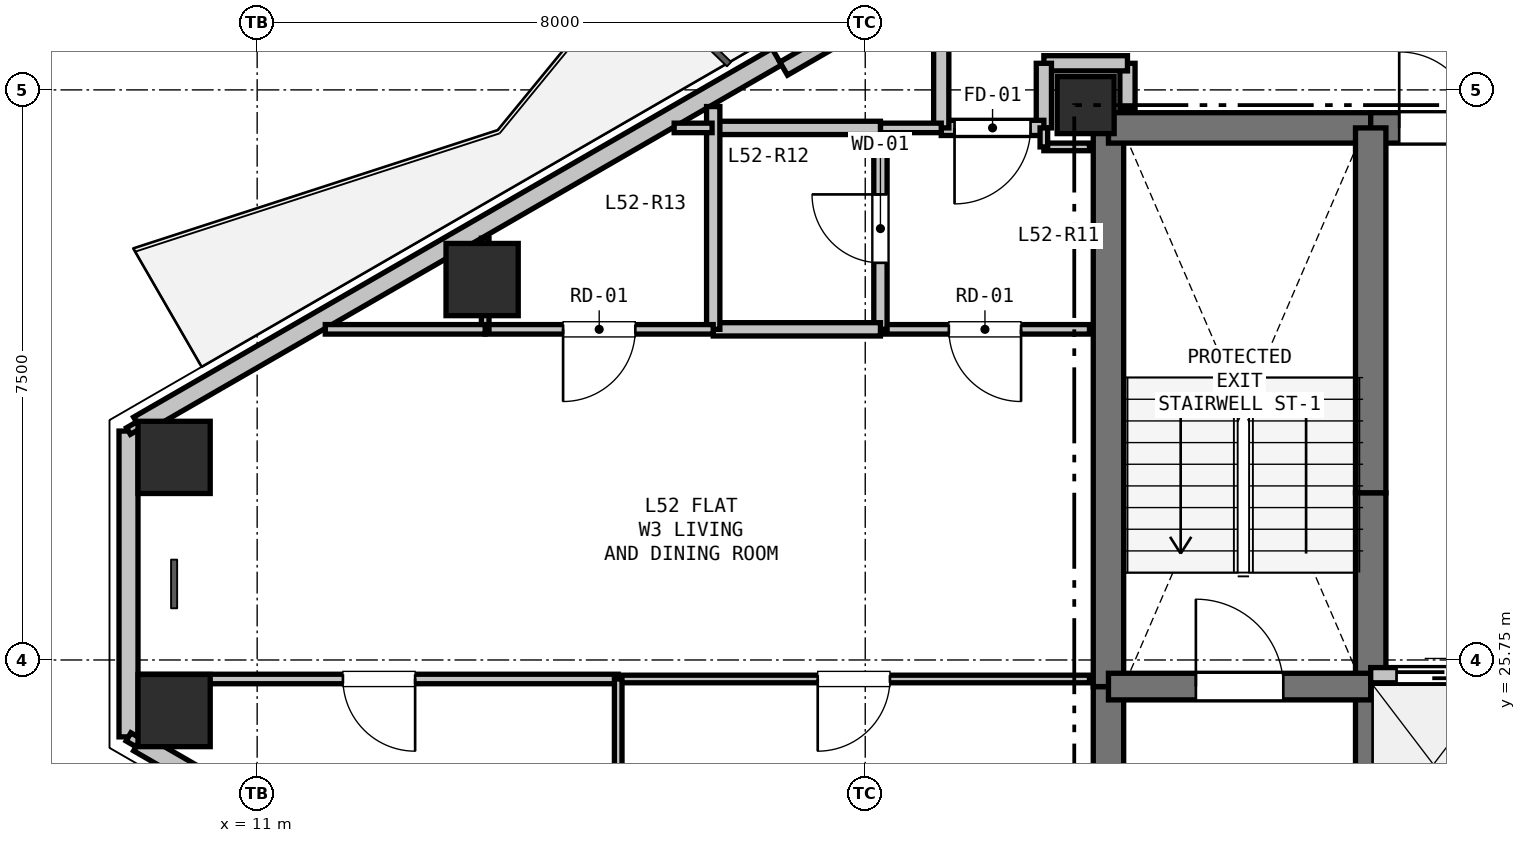
"""IFC4 building model, lengths in metres.
Left out: names, types, materials, properties, quantities, classifications, styles, units other than length and angle.
Written with IfcOpenShell. Run it as: python <this file> out.ifc"""

import sys

from ifc_helpers import new_model, si_unit, direction, frame, frame_2d, origin, origin_2d, place, context, subcontext, project, spatial, rectangle, hollow_rectangle, extrude, element, fill, save


model = new_model("IFC4")
c1 = context("Model", 3, precision=1e-05, world=origin(), true_north=direction((0.0, 1.0)))
c2 = subcontext(c1, "Body", "Model", "MODEL_VIEW")
j1 = project(units=[si_unit("LENGTHUNIT", "METRE"), si_unit("PLANEANGLEUNIT", "RADIAN")], contexts=[c1])
p1 = place(None, origin())
s1 = spatial("IfcSite", under=j1, at=p1, CompositionType="ELEMENT")
p2 = place(p1, origin())
s2 = spatial("IfcBuilding", under=s1, at=p2, CompositionType="ELEMENT")
p3 = place(p2, frame((0.0, 0.0, 188.7)))
s3 = spatial("IfcBuildingStorey", under=s2, at=p3, CompositionType="ELEMENT", Elevation=188.7)
p4 = place(p3, frame((21.9, 33.05, 0.0), z_axis=(0.0, 0.0, 1.0), x_axis=(1.0, 0.0, 0.0)))
e1 = element("IfcColumn", 1, at=p4, inside=s3, PredefinedType="COLUMN", context=c2, shape_type="SweptSolid", body=[
    extrude(rectangle(XDim=0.75, YDim=0.75, at=origin_2d()), origin(), (0.0, 0.0, 1.0), 3.3),
])
for number, where, z_axis, x_axis in (
    (2, (9.907, 28.415, 0.0), (0.0, 0.0, 1.0), (1.0, 0.0, 0.0)),
    (3, (13.96, 30.755, 0.0), (0.0, 0.0, 1.0), (1.0, 0.0, 0.0)),
    (4, (9.907, 25.085, 0.0), (0.0, 0.0, 1.0), (1.0, 0.0, 0.0)),
):
    element("IfcColumn", number, at=place(p3, frame(where, z_axis=z_axis, x_axis=x_axis)), inside=s3, PredefinedType="COLUMN", context=c2, shape_type="SweptSolid", body=[
        extrude(hollow_rectangle(XDim=0.95, YDim=0.95, WallThickness=0.028, at=origin_2d()), origin(), (0.0, 0.0, 1.0), 3.3),
    ])
p5 = place(p3, frame((9.308, 24.738, 0.0), z_axis=(0.0, 0.0, 1.0), x_axis=(0.0, 1.0, 0.0)))
e5 = element("IfcWall", 5, at=p5, inside=s3, PredefinedType="SOLIDWALL", context=c2, shape_type="SweptSolid", body=[
    extrude(rectangle(XDim=4.023, YDim=0.25, at=frame_2d((2.012, 0.0))), origin(), (0.0, 0.0, 1.0), 2.69),
])
p6 = place(p3, frame((9.438, 28.837, 0.0), z_axis=(0.0, 0.0, 1.0), x_axis=(0.866027133173, 0.499997004599, 0.0)))
e6 = element("IfcWall", 6, at=p6, inside=s3, PredefinedType="SOLIDWALL", context=c2, shape_type="SweptSolid", body=[
    extrude(rectangle(XDim=9.699, YDim=0.25, at=frame_2d((4.849, 0.0))), origin(), (0.0, 0.0, 1.0), 2.69),
])
p7 = place(p3, frame((17.927, 33.53, 0.0), z_axis=(0.0, 0.0, 1.0), x_axis=(0.86605165483, 0.499954529098, 0.0)))
e7 = element("IfcWall", 7, at=p7, inside=s3, PredefinedType="PARAPET", context=c2, shape_type="SweptSolid", body=[
    extrude(rectangle(XDim=1.7, YDim=0.2, at=frame_2d((0.85, 0.0))), origin(), (0.0, 0.0, 1.0), 2.69),
])
p8 = place(p3, frame((17.837, 19.814, 0.0), z_axis=(0.0, 0.0, 1.0), x_axis=(-0.866027133173, 0.499997004599, 0.0)))
e8 = element("IfcWall", 8, at=p8, inside=s3, PredefinedType="SOLIDWALL", context=c2, shape_type="SweptSolid", body=[
    extrude(rectangle(XDim=9.699, YDim=0.25, at=frame_2d((4.849, 0.0))), origin(), (0.0, 0.0, 1.0), 2.69),
])
p9 = place(p8, frame((5.512, 0.0, 0.9)))
e9 = element("IfcOpeningElement", 9, at=p9, cuts=e8, PredefinedType="OPENING", context=c2, shape_type="SweptSolid", body=[
    extrude(rectangle(XDim=1.2, YDim=1.4, at=frame_2d((0.6, 0.7))), frame((0.0, 0.135, 0.0), z_axis=(0.0, -1.0, 0.0), x_axis=(1.0, 0.0, 0.0)), (0.0, 0.0, 1.0), 0.27),
])
p10 = place(p3, frame((22.2, 20.75, 0.0), z_axis=(0.0, 0.0, 1.0), x_axis=(0.0, 1.0, 0.0)))
e10 = element("IfcWall", 10, at=p10, inside=s3, PredefinedType="SHEAR", context=c2, shape_type="SweptSolid", body=[
    extrude(rectangle(XDim=4.65, YDim=0.4, at=frame_2d((2.325, 0.0))), origin(), (0.0, 0.0, 1.0), 3.07),
])
p11 = place(p3, frame((22.2, 25.4, 0.0), z_axis=(0.0, 0.0, 1.0), x_axis=(0.0, 1.0, 0.0)))
e11 = element("IfcWall", 11, at=p11, inside=s3, PredefinedType="SHEAR", context=c2, shape_type="SweptSolid", body=[
    extrude(rectangle(XDim=7.35, YDim=0.4, at=frame_2d((3.675, 0.0))), origin(), (0.0, 0.0, 1.0), 3.07),
])
p12 = place(p3, frame((22.2, 32.75, 0.0), z_axis=(0.0, 0.0, 1.0), x_axis=(1.0, 0.0, 0.0)))
e12 = element("IfcWall", 12, at=p12, inside=s3, PredefinedType="SHEAR", context=c2, shape_type="SweptSolid", body=[
    extrude(rectangle(XDim=3.45, YDim=0.4, at=frame_2d((1.725, 0.0))), origin(), (0.0, 0.0, 1.0), 3.07),
])
p13 = place(p3, frame((25.65, 32.75, 0.0), z_axis=(0.0, 0.0, 1.0), x_axis=(1.0, 0.0, 0.0)))
e13 = element("IfcWall", 13, at=p13, inside=s3, PredefinedType="SHEAR", context=c2, shape_type="SweptSolid", body=[
    extrude(rectangle(XDim=1.75, YDim=0.4, at=frame_2d((0.875, 0.0))), origin(), (0.0, 0.0, 1.0), 3.07),
])
p14 = place(p13, frame((0.375, 0.0, 0.0)))
e14 = element("IfcOpeningElement", 14, at=p14, cuts=e13, PredefinedType="OPENING", context=c2, shape_type="SweptSolid", body=[
    extrude(rectangle(XDim=1.0, YDim=2.15, at=frame_2d((0.5, 1.075))), frame((0.0, 0.21, 0.0), z_axis=(0.0, -1.0, 0.0), x_axis=(1.0, 0.0, 0.0)), (0.0, 0.0, 1.0), 0.42),
])
p15 = place(p3, frame((25.65, 22.75, 0.0), z_axis=(0.0, 0.0, 1.0), x_axis=(0.0, 1.0, 0.0)))
e15 = element("IfcWall", 15, at=p15, inside=s3, PredefinedType="SHEAR", context=c2, shape_type="SweptSolid", body=[
    extrude(rectangle(XDim=2.8, YDim=0.4, at=frame_2d((1.4, 0.0))), origin(), (0.0, 0.0, 1.0), 3.07),
])
p16 = place(p3, frame((25.65, 25.55, 0.0), z_axis=(0.0, 0.0, 1.0), x_axis=(0.0, 1.0, 0.0)))
e16 = element("IfcWall", 16, at=p16, inside=s3, PredefinedType="SHEAR", context=c2, shape_type="SweptSolid", body=[
    extrude(rectangle(XDim=2.4, YDim=0.4, at=frame_2d((1.2, 0.0))), origin(), (0.0, 0.0, 1.0), 3.07),
])
p17 = place(p3, frame((25.65, 27.95, 0.0), z_axis=(0.0, 0.0, 1.0), x_axis=(0.0, 1.0, 0.0)))
e17 = element("IfcWall", 17, at=p17, inside=s3, PredefinedType="SHEAR", context=c2, shape_type="SweptSolid", body=[
    extrude(rectangle(XDim=4.8, YDim=0.4, at=frame_2d((2.4, 0.0))), origin(), (0.0, 0.0, 1.0), 3.07),
])
p18 = place(p3, frame((22.2, 25.4, 0.0), z_axis=(0.0, 0.0, 1.0), x_axis=(1.0, 0.0, 0.0)))
e18 = element("IfcWall", 18, at=p18, inside=s3, PredefinedType="SHEAR", context=c2, shape_type="SweptSolid", body=[
    extrude(rectangle(XDim=3.45, YDim=0.35, at=frame_2d((1.725, 0.0))), origin(), (0.0, 0.0, 1.0), 3.07),
])
p19 = place(p18, frame((1.15, 0.0, 0.0)))
e19 = element("IfcOpeningElement", 19, at=p19, cuts=e18, PredefinedType="OPENING", context=c2, shape_type="SweptSolid", body=[
    extrude(rectangle(XDim=1.15, YDim=2.15, at=frame_2d((0.575, 1.075))), frame((0.0, 0.185, 0.0), z_axis=(0.0, -1.0, 0.0), x_axis=(1.0, 0.0, 0.0)), (0.0, 0.0, 1.0), 0.37),
])
p20 = place(p3, frame((25.65, 25.55, 0.0), z_axis=(0.0, 0.0, 1.0), x_axis=(1.0, 0.0, 0.0)))
e20 = element("IfcWall", 20, at=p20, inside=s3, PredefinedType="PARTITIONING", context=c2, shape_type="SweptSolid", body=[
    extrude(rectangle(XDim=4.95, YDim=0.2, at=frame_2d((2.475, 0.0))), origin(), (0.0, 0.0, 1.0), 3.07),
])
p21 = place(p20, frame((0.34, 0.0, 0.0)))
e21 = element("IfcOpeningElement", 21, at=p21, cuts=e20, PredefinedType="OPENING", context=c2, shape_type="SweptSolid", body=[
    extrude(rectangle(XDim=1.1, YDim=2.15, at=frame_2d((0.55, 1.075))), frame((0.0, 0.11, 0.0), z_axis=(0.0, -1.0, 0.0), x_axis=(1.0, 0.0, 0.0)), (0.0, 0.0, 1.0), 0.22),
])
p22 = place(p20, frame((1.99, 0.0, 0.0)))
e22 = element("IfcOpeningElement", 22, at=p22, cuts=e20, PredefinedType="OPENING", context=c2, shape_type="SweptSolid", body=[
    extrude(rectangle(XDim=1.1, YDim=2.15, at=frame_2d((0.55, 1.075))), frame((0.0, 0.11, 0.0), z_axis=(0.0, -1.0, 0.0), x_axis=(1.0, 0.0, 0.0)), (0.0, 0.0, 1.0), 0.22),
])
p23 = place(p20, frame((3.64, 0.0, 0.0)))
e23 = element("IfcOpeningElement", 23, at=p23, cuts=e20, PredefinedType="OPENING", context=c2, shape_type="SweptSolid", body=[
    extrude(rectangle(XDim=1.1, YDim=2.15, at=frame_2d((0.55, 1.075))), frame((0.0, 0.11, 0.0), z_axis=(0.0, -1.0, 0.0), x_axis=(1.0, 0.0, 0.0)), (0.0, 0.0, 1.0), 0.22),
])
p24 = place(p3, frame((22.45, 33.0, 0.0), z_axis=(0.0, 0.0, 1.0), x_axis=(0.0, 1.0, 0.0)))
e24 = element("IfcWall", 24, at=p24, inside=s3, PredefinedType="PARTITIONING", context=c2, shape_type="SweptSolid", body=[
    extrude(rectangle(XDim=0.6, YDim=0.2, at=frame_2d((0.3, 0.0))), origin(), (0.0, 0.0, 1.0), 2.595),
])
p25 = place(p3, frame((22.45, 33.6, 0.0), z_axis=(0.0, 0.0, 1.0), x_axis=(-1.0, 0.0, 0.0)))
e25 = element("IfcWall", 25, at=p25, inside=s3, PredefinedType="PARTITIONING", context=c2, shape_type="SweptSolid", body=[
    extrude(rectangle(XDim=1.1, YDim=0.2, at=frame_2d((0.55, 0.0))), origin(), (0.0, 0.0, 1.0), 3.07),
])
p26 = place(p3, frame((21.35, 33.6, 0.0), z_axis=(0.0, 0.0, 1.0), x_axis=(0.0, -1.0, 0.0)))
e26 = element("IfcWall", 26, at=p26, inside=s3, PredefinedType="PARTITIONING", context=c2, shape_type="SweptSolid", body=[
    extrude(rectangle(XDim=0.85, YDim=0.2, at=frame_2d((0.425, 0.0))), origin(), (0.0, 0.0, 1.0), 2.518),
])
p27 = place(p3, frame((21.35, 32.75, 0.0), z_axis=(0.0, 0.0, 1.0), x_axis=(-1.0, 0.0, 0.0)))
e27 = element("IfcWall", 27, at=p27, inside=s3, PredefinedType="PARTITIONING", context=c2, shape_type="SweptSolid", body=[
    extrude(rectangle(XDim=1.35, YDim=0.2, at=frame_2d((0.675, 0.0))), origin(), (0.0, 0.0, 1.0), 2.518),
])
p28 = place(p27, frame((0.175, 0.0, 0.0)))
e28 = element("IfcOpeningElement", 28, at=p28, cuts=e27, PredefinedType="OPENING", context=c2, shape_type="SweptSolid", body=[
    extrude(rectangle(XDim=1.0, YDim=2.15, at=frame_2d((0.5, 1.075))), frame((0.0, 0.11, 0.0), z_axis=(0.0, -1.0, 0.0), x_axis=(1.0, 0.0, 0.0)), (0.0, 0.0, 1.0), 0.22),
])
p29 = place(p3, frame((20.0, 32.75, 0.0), z_axis=(0.0, 0.0, 1.0), x_axis=(0.0, 1.0, 0.0)))
e29 = element("IfcWall", 29, at=p29, inside=s3, PredefinedType="PARTITIONING", context=c2, shape_type="SweptSolid", body=[
    extrude(rectangle(XDim=2.141, YDim=0.2, at=frame_2d((1.071, 0.0))), origin(), (0.0, 0.0, 1.0), 2.365),
])
p30 = place(p3, frame((21.35, 32.5, 0.0), z_axis=(0.0, 0.0, 1.0), x_axis=(1.0, 0.0, 0.0)))
e30 = element("IfcWall", 30, at=p30, inside=s3, PredefinedType="PARTITIONING", context=c2, shape_type="SweptSolid", body=[
    extrude(rectangle(XDim=0.6, YDim=0.1, at=frame_2d((0.3, 0.0))), origin(), (0.0, 0.0, 1.0), 2.595),
])
p31 = place(p3, frame((21.95, 30.1, 0.0), z_axis=(0.0, 0.0, 1.0), x_axis=(-1.0, 0.0, 0.0)))
e31 = element("IfcWall", 31, at=p31, inside=s3, PredefinedType="PARTITIONING", context=c2, shape_type="SweptSolid", body=[
    extrude(rectangle(XDim=2.75, YDim=0.125, at=frame_2d((1.375, 0.0))), origin(), (0.0, 0.0, 1.0), 2.595),
])
p32 = place(p31, frame((0.9, 0.0, 0.0)))
e32 = element("IfcOpeningElement", 32, at=p32, cuts=e31, PredefinedType="OPENING", context=c2, shape_type="SweptSolid", body=[
    extrude(rectangle(XDim=0.95, YDim=2.1, at=frame_2d((0.475, 1.05))), frame((0.0, 0.073, 0.0), z_axis=(0.0, -1.0, 0.0), x_axis=(1.0, 0.0, 0.0)), (0.0, 0.0, 1.0), 0.145),
])
p33 = place(p3, frame((19.2, 30.1, 0.0), z_axis=(0.0, 0.0, 1.0), x_axis=(0.0, 1.0, 0.0)))
e33 = element("IfcWall", 33, at=p33, inside=s3, PredefinedType="PLUMBINGWALL", context=c2, shape_type="SweptSolid", body=[
    extrude(rectangle(XDim=2.65, YDim=0.175, at=frame_2d((1.325, 0.0))), origin(), (0.0, 0.0, 1.0), 2.518),
])
p34 = place(p33, frame((0.875, 0.0, 0.0)))
e34 = element("IfcOpeningElement", 34, at=p34, cuts=e33, PredefinedType="OPENING", context=c2, shape_type="SweptSolid", body=[
    extrude(rectangle(XDim=0.9, YDim=2.1, at=frame_2d((0.45, 1.05))), frame((0.0, 0.097, 0.0), z_axis=(0.0, -1.0, 0.0), x_axis=(1.0, 0.0, 0.0)), (0.0, 0.0, 1.0), 0.195),
])
p35 = place(p3, frame((19.2, 32.75, 0.0), z_axis=(0.0, 0.0, 1.0), x_axis=(1.0, 0.0, 0.0)))
e35 = element("IfcWall", 35, at=p35, inside=s3, PredefinedType="PARTITIONING", context=c2, shape_type="SweptSolid", body=[
    extrude(rectangle(XDim=0.8, YDim=0.125, at=frame_2d((0.4, 0.0))), origin(), (0.0, 0.0, 1.0), 3.07),
])
p36 = place(p3, frame((21.35, 32.75, 0.0), z_axis=(0.0, 0.0, 1.0), x_axis=(0.0, -1.0, 0.0)))
e36 = element("IfcWall", 36, at=p36, inside=s3, PredefinedType="PARTITIONING", context=c2, shape_type="SweptSolid", body=[
    extrude(rectangle(XDim=0.25, YDim=0.1, at=frame_2d((0.125, 0.0))), origin(), (0.0, 0.0, 1.0), 3.07),
])
p37 = place(p3, frame((17.0, 32.75, 0.0), z_axis=(0.0, 0.0, 1.0), x_axis=(1.0, 0.0, 0.0)))
e37 = element("IfcWall", 37, at=p37, inside=s3, PredefinedType="PLUMBINGWALL", context=c2, shape_type="SweptSolid", body=[
    extrude(rectangle(XDim=2.2, YDim=0.175, at=frame_2d((1.1, 0.0))), origin(), (0.0, 0.0, 1.0), 2.365),
])
p38 = place(p3, frame((19.2, 30.1, 0.0), z_axis=(0.0, 0.0, 1.0), x_axis=(-1.0, 0.0, 0.0)))
e38 = element("IfcWall", 38, at=p38, inside=s3, PredefinedType="PLUMBINGWALL", context=c2, shape_type="SweptSolid", body=[
    extrude(rectangle(XDim=2.2, YDim=0.175, at=frame_2d((1.1, 0.0))), origin(), (0.0, 0.0, 1.0), 3.07),
])
p39 = place(p3, frame((17.0, 30.1, 0.0), z_axis=(0.0, 0.0, 1.0), x_axis=(0.0, 1.0, 0.0)))
e39 = element("IfcWall", 39, at=p39, inside=s3, PredefinedType="PLUMBINGWALL", context=c2, shape_type="SweptSolid", body=[
    extrude(rectangle(XDim=2.931, YDim=0.175, at=frame_2d((1.465, 0.0))), origin(), (0.0, 0.0, 1.0), 2.365),
])
p40 = place(p3, frame((17.0, 30.1, 0.0), z_axis=(0.0, 0.0, 1.0), x_axis=(-1.0, 0.0, 0.0)))
e40 = element("IfcWall", 40, at=p40, inside=s3, PredefinedType="PARTITIONING", context=c2, shape_type="SweptSolid", body=[
    extrude(rectangle(XDim=3.0, YDim=0.125, at=frame_2d((1.5, 0.0))), origin(), (0.0, 0.0, 1.0), 3.07),
])
p41 = place(p40, frame((1.025, 0.0, 0.0)))
e41 = element("IfcOpeningElement", 41, at=p41, cuts=e40, PredefinedType="OPENING", context=c2, shape_type="SweptSolid", body=[
    extrude(rectangle(XDim=0.95, YDim=2.1, at=frame_2d((0.475, 1.05))), frame((0.0, 0.073, 0.0), z_axis=(0.0, -1.0, 0.0), x_axis=(1.0, 0.0, 0.0)), (0.0, 0.0, 1.0), 0.145),
])
p42 = place(p3, frame((14.0, 30.1, 0.0), z_axis=(0.0, 0.0, 1.0), x_axis=(0.0, 1.0, 0.0)))
e42 = element("IfcWall", 42, at=p42, inside=s3, PredefinedType="PARTITIONING", context=c2, shape_type="SweptSolid", body=[
    extrude(rectangle(XDim=1.199, YDim=0.1, at=frame_2d((0.599, 0.0))), origin(), (0.0, 0.0, 1.0), 3.07),
])
p43 = place(p3, frame((16.486, 32.75, 0.0), z_axis=(0.0, 0.0, 1.0), x_axis=(1.0, 0.0, 0.0)))
e43 = element("IfcWall", 43, at=p43, inside=s3, PredefinedType="PARTITIONING", context=c2, shape_type="SweptSolid", body=[
    extrude(rectangle(XDim=0.499, YDim=0.125, at=frame_2d((0.25, 0.0))), origin(), (0.0, 0.0, 1.0), 3.07),
])
p44 = place(p3, frame((11.896, 30.1, 0.0), z_axis=(0.0, 0.0, 1.0), x_axis=(1.0, 0.0, 0.0)))
e44 = element("IfcWall", 44, at=p44, inside=s3, PredefinedType="PARTITIONING", context=c2, shape_type="SweptSolid", body=[
    extrude(rectangle(XDim=2.104, YDim=0.125, at=frame_2d((1.052, 0.0))), origin(), (0.0, 0.0, 1.0), 2.735),
])
p45 = place(p3, frame((21.95, 25.5, 0.0), z_axis=(0.0, 0.0, 1.0), x_axis=(-1.0, 0.0, 0.0)))
e45 = element("IfcWall", 45, at=p45, inside=s3, PredefinedType="PARTITIONING", context=c2, shape_type="SweptSolid", body=[
    extrude(rectangle(XDim=6.2, YDim=0.1, at=frame_2d((3.1, 0.0))), origin(), (0.0, 0.0, 1.0), 2.595),
])
p46 = place(p45, frame((2.625, 0.0, 0.0)))
e46 = element("IfcOpeningElement", 46, at=p46, cuts=e45, PredefinedType="OPENING", context=c2, shape_type="SweptSolid", body=[
    extrude(rectangle(XDim=0.95, YDim=2.1, at=frame_2d((0.475, 1.05))), frame((0.0, 0.06, 0.0), z_axis=(0.0, -1.0, 0.0), x_axis=(1.0, 0.0, 0.0)), (0.0, 0.0, 1.0), 0.12),
])
p47 = place(p3, frame((15.75, 25.5, 0.0), z_axis=(0.0, 0.0, 1.0), x_axis=(-1.0, 0.0, 0.0)))
e47 = element("IfcWall", 47, at=p47, inside=s3, PredefinedType="PARTITIONING", context=c2, shape_type="SweptSolid", body=[
    extrude(rectangle(XDim=6.293, YDim=0.125, at=frame_2d((3.147, 0.0))), origin(), (0.0, 0.0, 1.0), 2.735),
])
p48 = place(p47, frame((2.672, 0.0, 0.0)))
e48 = element("IfcOpeningElement", 48, at=p48, cuts=e47, PredefinedType="OPENING", context=c2, shape_type="SweptSolid", body=[
    extrude(rectangle(XDim=0.95, YDim=2.1, at=frame_2d((0.475, 1.05))), frame((0.0, 0.073, 0.0), z_axis=(0.0, -1.0, 0.0), x_axis=(1.0, 0.0, 0.0)), (0.0, 0.0, 1.0), 0.145),
])
p49 = place(p3, frame((9.307, 28.762, 0.0), z_axis=(0.0, 0.0, 1.0), x_axis=(0.866239593359, 0.499628829129, 0.0)))
e49 = element("IfcWall", 49, at=p49, inside=s3, PredefinedType="PARTITIONING", context=c2, shape_type="SweptSolid", body=[
    extrude(rectangle(XDim=0.15, YDim=0.1, at=frame_2d((0.075, 0.0))), origin(), (0.0, 0.0, 1.0), 3.07),
])
p50 = place(p3, frame((9.437, 24.663, 0.0), z_axis=(0.0, 0.0, 1.0), x_axis=(-0.866239593359, 0.499628829129, 0.0)))
e50 = element("IfcWall", 50, at=p50, inside=s3, PredefinedType="PARTITIONING", context=c2, shape_type="SweptSolid", body=[
    extrude(rectangle(XDim=0.15, YDim=0.125, at=frame_2d((0.075, 0.0))), origin(), (0.0, 0.0, 1.0), 3.07),
])
p51 = place(p3, frame((15.75, 25.5, 0.0), z_axis=(0.0, 0.0, 1.0), x_axis=(0.0, -1.0, 0.0)))
e51 = element("IfcWall", 51, at=p51, inside=s3, PredefinedType="PARTITIONING", context=c2, shape_type="SweptSolid", body=[
    extrude(rectangle(XDim=4.309, YDim=0.1, at=frame_2d((2.155, 0.0))), origin(), (0.0, 0.0, 1.0), 2.365),
])
p52 = place(p51, frame((1.68, 0.0, 0.0)))
e52 = element("IfcOpeningElement", 52, at=p52, cuts=e51, PredefinedType="OPENING", context=c2, shape_type="SweptSolid", body=[
    extrude(rectangle(XDim=0.95, YDim=2.1, at=frame_2d((0.475, 1.05))), frame((0.0, 0.06, 0.0), z_axis=(0.0, -1.0, 0.0), x_axis=(1.0, 0.0, 0.0)), (0.0, 0.0, 1.0), 0.12),
])
p53 = place(p21, origin())
e53 = element("IfcDoor", 53, at=p53, inside=s3, OperationType="SLIDING_TO_LEFT", PredefinedType="DOOR", context=c2, shape_type="SweptSolid", body=[
    extrude(rectangle(XDim=1.1, YDim=2.15, at=frame_2d((0.55, 1.075))), frame((0.0, 0.025, 0.0), z_axis=(0.0, -1.0, 0.0), x_axis=(1.0, 0.0, 0.0)), (0.0, 0.0, 1.0), 0.05),
])
fill(e21, e53)
p54 = place(p14, origin())
e54 = element("IfcDoor", 54, at=p54, inside=s3, OperationType="SINGLE_SWING_LEFT", PredefinedType="DOOR", context=c2, shape_type="SweptSolid", body=[
    extrude(rectangle(XDim=1.0, YDim=2.15, at=frame_2d((0.5, 1.075))), frame((0.0, 0.025, 0.0), z_axis=(0.0, -1.0, 0.0), x_axis=(1.0, 0.0, 0.0)), (0.0, 0.0, 1.0), 0.05),
])
fill(e14, e54)
p55 = place(p19, origin())
e55 = element("IfcDoor", 55, at=p55, inside=s3, OperationType="SINGLE_SWING_LEFT", PredefinedType="DOOR", context=c2, shape_type="SweptSolid", body=[
    extrude(rectangle(XDim=1.15, YDim=2.15, at=frame_2d((0.575, 1.075))), frame((0.0, 0.025, 0.0), z_axis=(0.0, -1.0, 0.0), x_axis=(1.0, 0.0, 0.0)), (0.0, 0.0, 1.0), 0.05),
])
fill(e19, e55)
p56 = place(p28, origin())
e56 = element("IfcDoor", 56, at=p56, inside=s3, OperationType="SINGLE_SWING_RIGHT", PredefinedType="DOOR", context=c2, shape_type="SweptSolid", body=[
    extrude(rectangle(XDim=1.0, YDim=2.15, at=frame_2d((0.5, 1.075))), frame((0.0, 0.025, 0.0), z_axis=(0.0, -1.0, 0.0), x_axis=(1.0, 0.0, 0.0)), (0.0, 0.0, 1.0), 0.05),
])
fill(e28, e56)
p57 = place(p34, origin())
e57 = element("IfcDoor", 57, at=p57, inside=s3, OperationType="SINGLE_SWING_RIGHT", PredefinedType="DOOR", context=c2, shape_type="SweptSolid", body=[
    extrude(rectangle(XDim=0.9, YDim=2.1, at=frame_2d((0.45, 1.05))), frame((0.0, 0.025, 0.0), z_axis=(0.0, -1.0, 0.0), x_axis=(1.0, 0.0, 0.0)), (0.0, 0.0, 1.0), 0.05),
])
fill(e34, e57)
p58 = place(p32, origin())
e58 = element("IfcDoor", 58, at=p58, inside=s3, OperationType="SINGLE_SWING_LEFT", PredefinedType="DOOR", context=c2, shape_type="SweptSolid", body=[
    extrude(rectangle(XDim=0.95, YDim=2.1, at=frame_2d((0.475, 1.05))), frame((0.0, 0.025, 0.0), z_axis=(0.0, -1.0, 0.0), x_axis=(1.0, 0.0, 0.0)), (0.0, 0.0, 1.0), 0.05),
])
fill(e32, e58)
p59 = place(p41, origin())
e59 = element("IfcDoor", 59, at=p59, inside=s3, OperationType="SINGLE_SWING_RIGHT", PredefinedType="DOOR", context=c2, shape_type="SweptSolid", body=[
    extrude(rectangle(XDim=0.95, YDim=2.1, at=frame_2d((0.475, 1.05))), frame((0.0, 0.025, 0.0), z_axis=(0.0, -1.0, 0.0), x_axis=(1.0, 0.0, 0.0)), (0.0, 0.0, 1.0), 0.05),
])
fill(e41, e59)
p60 = place(p48, origin())
e60 = element("IfcDoor", 60, at=p60, inside=s3, OperationType="SINGLE_SWING_LEFT", PredefinedType="DOOR", context=c2, shape_type="SweptSolid", body=[
    extrude(rectangle(XDim=0.95, YDim=2.1, at=frame_2d((0.475, 1.05))), frame((0.0, 0.025, 0.0), z_axis=(0.0, -1.0, 0.0), x_axis=(1.0, 0.0, 0.0)), (0.0, 0.0, 1.0), 0.05),
])
fill(e48, e60)
p61 = place(p46, origin())
e61 = element("IfcDoor", 61, at=p61, inside=s3, OperationType="SINGLE_SWING_RIGHT", PredefinedType="DOOR", context=c2, shape_type="SweptSolid", body=[
    extrude(rectangle(XDim=0.95, YDim=2.1, at=frame_2d((0.475, 1.05))), frame((0.0, 0.025, 0.0), z_axis=(0.0, -1.0, 0.0), x_axis=(1.0, 0.0, 0.0)), (0.0, 0.0, 1.0), 0.05),
])
fill(e46, e61)
save(model, sys.argv[1])
